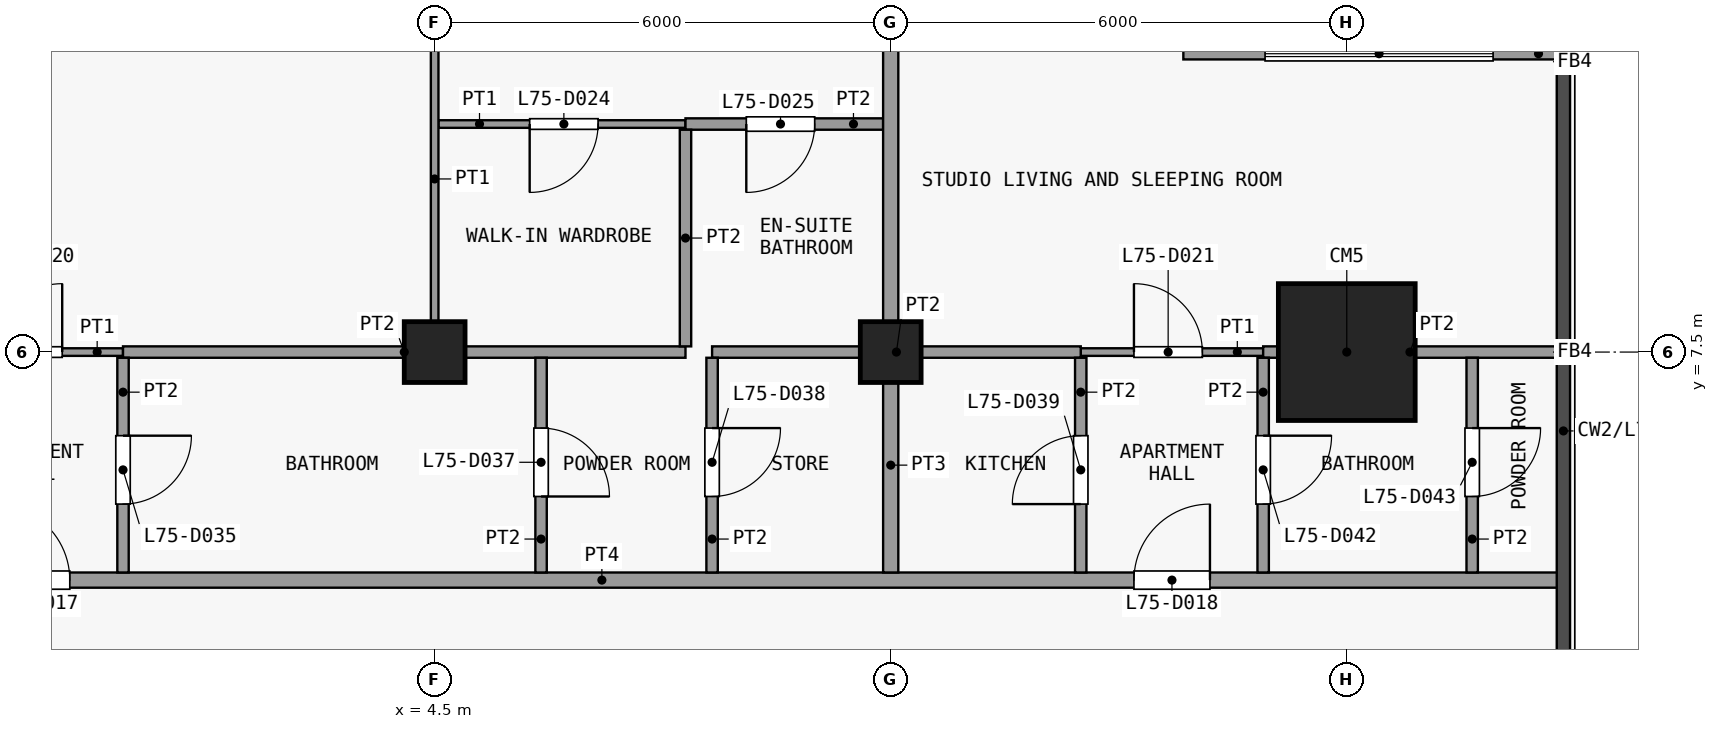
"""IFC4 building model, lengths in metres.
Left out: names, types, materials, properties, quantities, classifications, styles, units other than length and angle.
Written with IfcOpenShell. Run it as: python <this file> out.ifc"""

import sys

from ifc_helpers import new_model, si_unit, direction, frame, frame_2d, origin, origin_2d, place, context, subcontext, project, spatial, rectangle, extrude, element, fill, save


model = new_model("IFC4")
c1 = context("Model", 3, precision=1e-05, world=origin(), true_north=direction((0.0, 1.0)))
c2 = subcontext(c1, "Body", "Model", "MODEL_VIEW")
j1 = project(units=[si_unit("LENGTHUNIT", "METRE"), si_unit("PLANEANGLEUNIT", "RADIAN")], contexts=[c1])
p1 = place(None, origin())
s1 = spatial("IfcSite", under=j1, at=p1, CompositionType="ELEMENT")
p2 = place(p1, origin())
s2 = spatial("IfcBuilding", under=s1, at=p2, CompositionType="ELEMENT")
p3 = place(p2, frame((0.0, 0.0, 295.1)))
s3 = spatial("IfcBuildingStorey", under=s2, at=p3, CompositionType="ELEMENT", Elevation=295.1)
for number, where, z_axis, x_axis in (
    (1, (4.5, 7.5, 0.0), (0.0, 0.0, 1.0), (1.0, 0.0, 0.0)),
    (2, (10.5, 7.5, 0.0), (0.0, 0.0, 1.0), (1.0, 0.0, 0.0)),
):
    element("IfcColumn", number, at=place(p3, frame(where, z_axis=z_axis, x_axis=x_axis)), inside=s3, PredefinedType="COLUMN", context=c2, shape_type="SweptSolid", body=[
        extrude(rectangle(XDim=0.8, YDim=0.8, at=origin_2d()), origin(), (0.0, 0.0, 1.0), 3.6),
    ])
p4 = place(p3, frame((16.5, 7.5, 0.0), z_axis=(0.0, 0.0, 1.0), x_axis=(1.0, 0.0, 0.0)))
e3 = element("IfcColumn", 3, at=p4, inside=s3, PredefinedType="COLUMN", context=c2, shape_type="SweptSolid", body=[
    extrude(rectangle(XDim=1.8, YDim=1.8, at=origin_2d()), origin(), (0.0, 0.0, 1.0), 3.6),
])
p5 = place(p3, frame((14.35, 11.425, 0.0), z_axis=(0.0, 0.0, 1.0), x_axis=(1.0, 0.0, 0.0)))
e4 = element("IfcWall", 4, at=p5, inside=s3, PredefinedType="SOLIDWALL", context=c2, shape_type="SweptSolid", body=[
    extrude(rectangle(XDim=5.15, YDim=0.15, at=frame_2d((2.575, 0.0))), origin(), (0.0, 0.0, 1.0), 3.2),
])
p6 = place(p5, frame((1.075, 0.0, 0.9)))
e5 = element("IfcOpeningElement", 5, at=p6, cuts=e4, PredefinedType="OPENING", context=c2, shape_type="SweptSolid", body=[
    extrude(rectangle(XDim=3.0, YDim=2.4, at=frame_2d((1.5, 1.2))), frame((0.0, 0.085, 0.0), z_axis=(0.0, -1.0, 0.0), x_axis=(1.0, 0.0, 0.0)), (0.0, 0.0, 1.0), 0.17),
])
p7 = place(p3, frame((-20.25, 4.5, 0.0), z_axis=(0.0, 0.0, 1.0), x_axis=(1.0, 0.0, 0.0)))
e6 = element("IfcWall", 6, at=p7, inside=s3, PredefinedType="PARTITIONING", context=c2, shape_type="SweptSolid", body=[
    extrude(rectangle(XDim=39.6, YDim=0.2, at=frame_2d((19.8, 0.0))), origin(), (0.0, 0.0, 1.0), 3.2),
])
p8 = place(p7, frame((7.95, 0.0, 0.0)))
e7 = element("IfcOpeningElement", 7, at=p8, cuts=e6, PredefinedType="OPENING", context=c2, shape_type="SweptSolid", body=[
    extrude(rectangle(XDim=1.0, YDim=2.1, at=frame_2d((0.5, 1.05))), frame((0.0, 0.11, 0.0), z_axis=(0.0, -1.0, 0.0), x_axis=(1.0, 0.0, 0.0)), (0.0, 0.0, 1.0), 0.22),
])
p9 = place(p7, frame((18.95, 0.0, 0.0)))
e8 = element("IfcOpeningElement", 8, at=p9, cuts=e6, PredefinedType="OPENING", context=c2, shape_type="SweptSolid", body=[
    extrude(rectangle(XDim=1.0, YDim=2.1, at=frame_2d((0.5, 1.05))), frame((0.0, 0.11, 0.0), z_axis=(0.0, -1.0, 0.0), x_axis=(1.0, 0.0, 0.0)), (0.0, 0.0, 1.0), 0.22),
])
p10 = place(p7, frame((33.95, 0.0, 0.0)))
e9 = element("IfcOpeningElement", 9, at=p10, cuts=e6, PredefinedType="OPENING", context=c2, shape_type="SweptSolid", body=[
    extrude(rectangle(XDim=1.0, YDim=2.1, at=frame_2d((0.5, 1.05))), frame((0.0, 0.11, 0.0), z_axis=(0.0, -1.0, 0.0), x_axis=(1.0, 0.0, 0.0)), (0.0, 0.0, 1.0), 0.22),
])
p11 = place(p3, frame((-2.0, 7.5, 0.0), z_axis=(0.0, 0.0, 1.0), x_axis=(1.0, 0.0, 0.0)))
e10 = element("IfcWall", 10, at=p11, inside=s3, PredefinedType="PARTITIONING", context=c2, shape_type="SweptSolid", body=[
    extrude(rectangle(XDim=2.4, YDim=0.1, at=frame_2d((1.2, 0.0))), origin(), (0.0, 0.0, 1.0), 3.2),
])
p12 = place(p11, frame((0.7, 0.0, 0.0)))
e11 = element("IfcOpeningElement", 11, at=p12, cuts=e10, PredefinedType="OPENING", context=c2, shape_type="SweptSolid", body=[
    extrude(rectangle(XDim=0.9, YDim=2.1, at=frame_2d((0.45, 1.05))), frame((0.0, 0.06, 0.0), z_axis=(0.0, -1.0, 0.0), x_axis=(1.0, 0.0, 0.0)), (0.0, 0.0, 1.0), 0.12),
])
p13 = place(p3, frame((13.0, 7.5, 0.0), z_axis=(0.0, 0.0, 1.0), x_axis=(1.0, 0.0, 0.0)))
e12 = element("IfcWall", 12, at=p13, inside=s3, PredefinedType="PARTITIONING", context=c2, shape_type="SweptSolid", body=[
    extrude(rectangle(XDim=2.4, YDim=0.1, at=frame_2d((1.2, 0.0))), origin(), (0.0, 0.0, 1.0), 3.2),
])
p14 = place(p13, frame((0.7, 0.0, 0.0)))
e13 = element("IfcOpeningElement", 13, at=p14, cuts=e12, PredefinedType="OPENING", context=c2, shape_type="SweptSolid", body=[
    extrude(rectangle(XDim=0.9, YDim=2.1, at=frame_2d((0.45, 1.05))), frame((0.0, 0.06, 0.0), z_axis=(0.0, -1.0, 0.0), x_axis=(1.0, 0.0, 0.0)), (0.0, 0.0, 1.0), 0.12),
])
p15 = place(p3, frame((0.4, 7.5, 0.0), z_axis=(0.0, 0.0, 1.0), x_axis=(1.0, 0.0, 0.0)))
e14 = element("IfcWall", 14, at=p15, inside=s3, PredefinedType="PARTITIONING", context=c2, shape_type="SweptSolid", body=[
    extrude(rectangle(XDim=7.4, YDim=0.15, at=frame_2d((3.7, 0.0))), origin(), (0.0, 0.0, 1.0), 3.2),
])
p16 = place(p3, frame((8.15, 7.5, 0.0), z_axis=(0.0, 0.0, 1.0), x_axis=(1.0, 0.0, 0.0)))
e15 = element("IfcWall", 15, at=p16, inside=s3, PredefinedType="PARTITIONING", context=c2, shape_type="SweptSolid", body=[
    extrude(rectangle(XDim=4.85, YDim=0.15, at=frame_2d((2.425, 0.0))), origin(), (0.0, 0.0, 1.0), 3.2),
])
p17 = place(p3, frame((15.4, 7.5, 0.0), z_axis=(0.0, 0.0, 1.0), x_axis=(1.0, 0.0, 0.0)))
e16 = element("IfcWall", 16, at=p17, inside=s3, PredefinedType="PARTITIONING", context=c2, shape_type="SweptSolid", body=[
    extrude(rectangle(XDim=3.863, YDim=0.15, at=frame_2d((1.931, 0.0))), origin(), (0.0, 0.0, 1.0), 3.2),
])
p18 = place(p3, frame((4.55, 10.5, 0.0), z_axis=(0.0, 0.0, 1.0), x_axis=(1.0, 0.0, 0.0)))
e17 = element("IfcWall", 17, at=p18, inside=s3, PredefinedType="PARTITIONING", context=c2, shape_type="SweptSolid", body=[
    extrude(rectangle(XDim=3.25, YDim=0.1, at=frame_2d((1.625, 0.0))), origin(), (0.0, 0.0, 1.0), 3.2),
])
p19 = place(p18, frame((1.2, 0.0, 0.0)))
e18 = element("IfcOpeningElement", 18, at=p19, cuts=e17, PredefinedType="OPENING", context=c2, shape_type="SweptSolid", body=[
    extrude(rectangle(XDim=0.9, YDim=2.1, at=frame_2d((0.45, 1.05))), frame((0.0, 0.06, 0.0), z_axis=(0.0, -1.0, 0.0), x_axis=(1.0, 0.0, 0.0)), (0.0, 0.0, 1.0), 0.12),
])
p20 = place(p3, frame((7.8, 10.5, 0.0), z_axis=(0.0, 0.0, 1.0), x_axis=(1.0, 0.0, 0.0)))
e19 = element("IfcWall", 19, at=p20, inside=s3, PredefinedType="PARTITIONING", context=c2, shape_type="SweptSolid", body=[
    extrude(rectangle(XDim=2.6, YDim=0.15, at=frame_2d((1.3, 0.0))), origin(), (0.0, 0.0, 1.0), 3.2),
])
p21 = place(p20, frame((0.8, 0.0, 0.0)))
e20 = element("IfcOpeningElement", 20, at=p21, cuts=e19, PredefinedType="OPENING", context=c2, shape_type="SweptSolid", body=[
    extrude(rectangle(XDim=0.9, YDim=2.1, at=frame_2d((0.45, 1.05))), frame((0.0, 0.085, 0.0), z_axis=(0.0, -1.0, 0.0), x_axis=(1.0, 0.0, 0.0)), (0.0, 0.0, 1.0), 0.17),
])
p22 = place(p3, frame((0.4, 4.6, 0.0), z_axis=(0.0, 0.0, 1.0), x_axis=(0.0, 1.0, 0.0)))
e21 = element("IfcWall", 21, at=p22, inside=s3, PredefinedType="PARTITIONING", context=c2, shape_type="SweptSolid", body=[
    extrude(rectangle(XDim=2.825, YDim=0.15, at=frame_2d((1.413, 0.0))), origin(), (0.0, 0.0, 1.0), 3.2),
])
p23 = place(p22, frame((0.9, 0.0, 0.0)))
e22 = element("IfcOpeningElement", 22, at=p23, cuts=e21, PredefinedType="OPENING", context=c2, shape_type="SweptSolid", body=[
    extrude(rectangle(XDim=0.9, YDim=2.1, at=frame_2d((0.45, 1.05))), frame((0.0, 0.085, 0.0), z_axis=(0.0, -1.0, 0.0), x_axis=(1.0, 0.0, 0.0)), (0.0, 0.0, 1.0), 0.17),
])
p24 = place(p3, frame((4.5, 7.575, 0.0), z_axis=(0.0, 0.0, 1.0), x_axis=(0.0, 1.0, 0.0)))
e23 = element("IfcWall", 23, at=p24, inside=s3, PredefinedType="PARTITIONING", context=c2, shape_type="SweptSolid", body=[
    extrude(rectangle(XDim=8.688, YDim=0.1, at=frame_2d((4.344, 0.0))), origin(), (0.0, 0.0, 1.0), 3.2),
])
p25 = place(p24, frame((4.525, 0.0, 0.0)))
e24 = element("IfcOpeningElement", 24, at=p25, cuts=e23, PredefinedType="OPENING", context=c2, shape_type="SweptSolid", body=[
    extrude(rectangle(XDim=0.9, YDim=2.1, at=frame_2d((0.45, 1.05))), frame((0.0, 0.06, 0.0), z_axis=(0.0, -1.0, 0.0), x_axis=(1.0, 0.0, 0.0)), (0.0, 0.0, 1.0), 0.12),
])
p26 = place(p3, frame((5.9, 4.6, 0.0), z_axis=(0.0, 0.0, 1.0), x_axis=(0.0, 1.0, 0.0)))
e25 = element("IfcWall", 25, at=p26, inside=s3, PredefinedType="PARTITIONING", context=c2, shape_type="SweptSolid", body=[
    extrude(rectangle(XDim=2.825, YDim=0.15, at=frame_2d((1.413, 0.0))), origin(), (0.0, 0.0, 1.0), 3.2),
])
p27 = place(p26, frame((1.0, 0.0, 0.0)))
e26 = element("IfcOpeningElement", 26, at=p27, cuts=e25, PredefinedType="OPENING", context=c2, shape_type="SweptSolid", body=[
    extrude(rectangle(XDim=0.9, YDim=2.1, at=frame_2d((0.45, 1.05))), frame((0.0, 0.085, 0.0), z_axis=(0.0, -1.0, 0.0), x_axis=(1.0, 0.0, 0.0)), (0.0, 0.0, 1.0), 0.17),
])
p28 = place(p3, frame((7.8, 7.575, 0.0), z_axis=(0.0, 0.0, 1.0), x_axis=(0.0, 1.0, 0.0)))
e27 = element("IfcWall", 27, at=p28, inside=s3, PredefinedType="PARTITIONING", context=c2, shape_type="SweptSolid", body=[
    extrude(rectangle(XDim=2.85, YDim=0.15, at=frame_2d((1.425, 0.0))), origin(), (0.0, 0.0, 1.0), 3.2),
])
p29 = place(p3, frame((8.15, 4.6, 0.0), z_axis=(0.0, 0.0, 1.0), x_axis=(0.0, 1.0, 0.0)))
e28 = element("IfcWall", 28, at=p29, inside=s3, PredefinedType="PARTITIONING", context=c2, shape_type="SweptSolid", body=[
    extrude(rectangle(XDim=2.825, YDim=0.15, at=frame_2d((1.413, 0.0))), origin(), (0.0, 0.0, 1.0), 3.2),
])
p30 = place(p29, frame((1.0, 0.0, 0.0)))
e29 = element("IfcOpeningElement", 29, at=p30, cuts=e28, PredefinedType="OPENING", context=c2, shape_type="SweptSolid", body=[
    extrude(rectangle(XDim=0.9, YDim=2.1, at=frame_2d((0.45, 1.05))), frame((0.0, 0.085, 0.0), z_axis=(0.0, -1.0, 0.0), x_axis=(1.0, 0.0, 0.0)), (0.0, 0.0, 1.0), 0.17),
])
p31 = place(p3, frame((10.5, 4.6, 0.0), z_axis=(0.0, 0.0, 1.0), x_axis=(0.0, 1.0, 0.0)))
e30 = element("IfcWall", 30, at=p31, inside=s3, PredefinedType="PARTITIONING", context=c2, shape_type="SweptSolid", body=[
    extrude(rectangle(XDim=2.825, YDim=0.2, at=frame_2d((1.413, 0.0))), origin(), (0.0, 0.0, 1.0), 3.2),
])
p32 = place(p3, frame((10.5, 7.575, 0.0), z_axis=(0.0, 0.0, 1.0), x_axis=(0.0, 1.0, 0.0)))
e31 = element("IfcWall", 31, at=p32, inside=s3, PredefinedType="PARTITIONING", context=c2, shape_type="SweptSolid", body=[
    extrude(rectangle(XDim=8.688, YDim=0.2, at=frame_2d((4.344, 0.0))), origin(), (0.0, 0.0, 1.0), 3.2),
])
p33 = place(p3, frame((13.0, 4.6, 0.0), z_axis=(0.0, 0.0, 1.0), x_axis=(0.0, 1.0, 0.0)))
e32 = element("IfcWall", 32, at=p33, inside=s3, PredefinedType="PARTITIONING", context=c2, shape_type="SweptSolid", body=[
    extrude(rectangle(XDim=2.825, YDim=0.15, at=frame_2d((1.413, 0.0))), origin(), (0.0, 0.0, 1.0), 3.2),
])
p34 = place(p33, frame((0.9, 0.0, 0.0)))
e33 = element("IfcOpeningElement", 33, at=p34, cuts=e32, PredefinedType="OPENING", context=c2, shape_type="SweptSolid", body=[
    extrude(rectangle(XDim=0.9, YDim=2.1, at=frame_2d((0.45, 1.05))), frame((0.0, 0.085, 0.0), z_axis=(0.0, -1.0, 0.0), x_axis=(1.0, 0.0, 0.0)), (0.0, 0.0, 1.0), 0.17),
])
p35 = place(p3, frame((15.4, 4.6, 0.0), z_axis=(0.0, 0.0, 1.0), x_axis=(0.0, 1.0, 0.0)))
e34 = element("IfcWall", 34, at=p35, inside=s3, PredefinedType="PARTITIONING", context=c2, shape_type="SweptSolid", body=[
    extrude(rectangle(XDim=2.825, YDim=0.15, at=frame_2d((1.413, 0.0))), origin(), (0.0, 0.0, 1.0), 3.2),
])
p36 = place(p35, frame((0.9, 0.0, 0.0)))
e35 = element("IfcOpeningElement", 35, at=p36, cuts=e34, PredefinedType="OPENING", context=c2, shape_type="SweptSolid", body=[
    extrude(rectangle(XDim=0.9, YDim=2.1, at=frame_2d((0.45, 1.05))), frame((0.0, 0.085, 0.0), z_axis=(0.0, -1.0, 0.0), x_axis=(1.0, 0.0, 0.0)), (0.0, 0.0, 1.0), 0.17),
])
p37 = place(p3, frame((18.15, 4.6, 0.0), z_axis=(0.0, 0.0, 1.0), x_axis=(0.0, 1.0, 0.0)))
e36 = element("IfcWall", 36, at=p37, inside=s3, PredefinedType="PARTITIONING", context=c2, shape_type="SweptSolid", body=[
    extrude(rectangle(XDim=2.825, YDim=0.15, at=frame_2d((1.413, 0.0))), origin(), (0.0, 0.0, 1.0), 3.2),
])
p38 = place(p37, frame((1.0, 0.0, 0.0)))
e37 = element("IfcOpeningElement", 37, at=p38, cuts=e36, PredefinedType="OPENING", context=c2, shape_type="SweptSolid", body=[
    extrude(rectangle(XDim=0.9, YDim=2.1, at=frame_2d((0.45, 1.05))), frame((0.0, 0.085, 0.0), z_axis=(0.0, -1.0, 0.0), x_axis=(1.0, 0.0, 0.0)), (0.0, 0.0, 1.0), 0.17),
])
p39 = place(p6, origin())
e38 = element("IfcWindow", 38, at=p39, inside=s3, PartitioningType="SINGLE_PANEL", PredefinedType="WINDOW", context=c2, shape_type="SweptSolid", body=[
    extrude(rectangle(XDim=3.0, YDim=2.4, at=frame_2d((1.5, 1.2))), frame((0.0, 0.03, 0.0), z_axis=(0.0, -1.0, 0.0), x_axis=(1.0, 0.0, 0.0)), (0.0, 0.0, 1.0), 0.06),
])
fill(e5, e38)
p40 = place(p9, origin())
e39 = element("IfcDoor", 39, at=p40, inside=s3, OperationType="SINGLE_SWING_RIGHT", PredefinedType="DOOR", context=c2, shape_type="SweptSolid", body=[
    extrude(rectangle(XDim=1.0, YDim=2.1, at=frame_2d((0.5, 1.05))), frame((0.0, 0.025, 0.0), z_axis=(0.0, -1.0, 0.0), x_axis=(1.0, 0.0, 0.0)), (0.0, 0.0, 1.0), 0.05),
])
fill(e8, e39)
p41 = place(p10, origin())
e40 = element("IfcDoor", 40, at=p41, inside=s3, OperationType="SINGLE_SWING_LEFT", PredefinedType="DOOR", context=c2, shape_type="SweptSolid", body=[
    extrude(rectangle(XDim=1.0, YDim=2.1, at=frame_2d((0.5, 1.05))), frame((0.0, 0.025, 0.0), z_axis=(0.0, -1.0, 0.0), x_axis=(1.0, 0.0, 0.0)), (0.0, 0.0, 1.0), 0.05),
])
fill(e9, e40)
p42 = place(p12, origin())
e41 = element("IfcDoor", 41, at=p42, inside=s3, OperationType="SINGLE_SWING_LEFT", PredefinedType="DOOR", context=c2, shape_type="SweptSolid", body=[
    extrude(rectangle(XDim=0.9, YDim=2.1, at=frame_2d((0.45, 1.05))), frame((0.0, 0.025, 0.0), z_axis=(0.0, -1.0, 0.0), x_axis=(1.0, 0.0, 0.0)), (0.0, 0.0, 1.0), 0.05),
])
fill(e11, e41)
p43 = place(p14, origin())
e42 = element("IfcDoor", 42, at=p43, inside=s3, OperationType="SINGLE_SWING_RIGHT", PredefinedType="DOOR", context=c2, shape_type="SweptSolid", body=[
    extrude(rectangle(XDim=0.9, YDim=2.1, at=frame_2d((0.45, 1.05))), frame((0.0, 0.025, 0.0), z_axis=(0.0, -1.0, 0.0), x_axis=(1.0, 0.0, 0.0)), (0.0, 0.0, 1.0), 0.05),
])
fill(e13, e42)
p44 = place(p19, origin())
e43 = element("IfcDoor", 43, at=p44, inside=s3, OperationType="SINGLE_SWING_LEFT", PredefinedType="DOOR", context=c2, shape_type="SweptSolid", body=[
    extrude(rectangle(XDim=0.9, YDim=2.1, at=frame_2d((0.45, 1.05))), frame((0.0, 0.025, 0.0), z_axis=(0.0, -1.0, 0.0), x_axis=(1.0, 0.0, 0.0)), (0.0, 0.0, 1.0), 0.05),
])
fill(e18, e43)
p45 = place(p21, origin())
e44 = element("IfcDoor", 44, at=p45, inside=s3, OperationType="SINGLE_SWING_LEFT", PredefinedType="DOOR", context=c2, shape_type="SweptSolid", body=[
    extrude(rectangle(XDim=0.9, YDim=2.1, at=frame_2d((0.45, 1.05))), frame((0.0, 0.025, 0.0), z_axis=(0.0, -1.0, 0.0), x_axis=(1.0, 0.0, 0.0)), (0.0, 0.0, 1.0), 0.05),
])
fill(e20, e44)
p46 = place(p23, origin())
e45 = element("IfcDoor", 45, at=p46, inside=s3, OperationType="SINGLE_SWING_RIGHT", PredefinedType="DOOR", context=c2, shape_type="SweptSolid", body=[
    extrude(rectangle(XDim=0.9, YDim=2.1, at=frame_2d((0.45, 1.05))), frame((0.0, 0.025, 0.0), z_axis=(0.0, -1.0, 0.0), x_axis=(1.0, 0.0, 0.0)), (0.0, 0.0, 1.0), 0.05),
])
fill(e22, e45)
p47 = place(p27, origin())
e46 = element("IfcDoor", 46, at=p47, inside=s3, OperationType="SINGLE_SWING_LEFT", PredefinedType="DOOR", context=c2, shape_type="SweptSolid", body=[
    extrude(rectangle(XDim=0.9, YDim=2.1, at=frame_2d((0.45, 1.05))), frame((0.0, 0.025, 0.0), z_axis=(0.0, -1.0, 0.0), x_axis=(1.0, 0.0, 0.0)), (0.0, 0.0, 1.0), 0.05),
])
fill(e26, e46)
p48 = place(p30, origin())
e47 = element("IfcDoor", 47, at=p48, inside=s3, OperationType="SINGLE_SWING_RIGHT", PredefinedType="DOOR", context=c2, shape_type="SweptSolid", body=[
    extrude(rectangle(XDim=0.9, YDim=2.1, at=frame_2d((0.45, 1.05))), frame((0.0, 0.025, 0.0), z_axis=(0.0, -1.0, 0.0), x_axis=(1.0, 0.0, 0.0)), (0.0, 0.0, 1.0), 0.05),
])
fill(e29, e47)
p49 = place(p34, origin())
e48 = element("IfcDoor", 48, at=p49, inside=s3, OperationType="SINGLE_SWING_RIGHT", PredefinedType="DOOR", context=c2, shape_type="SweptSolid", body=[
    extrude(rectangle(XDim=0.9, YDim=2.1, at=frame_2d((0.45, 1.05))), frame((0.0, 0.025, 0.0), z_axis=(0.0, -1.0, 0.0), x_axis=(1.0, 0.0, 0.0)), (0.0, 0.0, 1.0), 0.05),
])
fill(e33, e48)
p50 = place(p36, origin())
e49 = element("IfcDoor", 49, at=p50, inside=s3, OperationType="SINGLE_SWING_RIGHT", PredefinedType="DOOR", context=c2, shape_type="SweptSolid", body=[
    extrude(rectangle(XDim=0.9, YDim=2.1, at=frame_2d((0.45, 1.05))), frame((0.0, 0.025, 0.0), z_axis=(0.0, -1.0, 0.0), x_axis=(1.0, 0.0, 0.0)), (0.0, 0.0, 1.0), 0.05),
])
fill(e35, e49)
p51 = place(p38, origin())
e50 = element("IfcDoor", 50, at=p51, inside=s3, OperationType="SINGLE_SWING_RIGHT", PredefinedType="DOOR", context=c2, shape_type="SweptSolid", body=[
    extrude(rectangle(XDim=0.9, YDim=2.1, at=frame_2d((0.45, 1.05))), frame((0.0, 0.025, 0.0), z_axis=(0.0, -1.0, 0.0), x_axis=(1.0, 0.0, 0.0)), (0.0, 0.0, 1.0), 0.05),
])
fill(e37, e50)
save(model, sys.argv[1])
